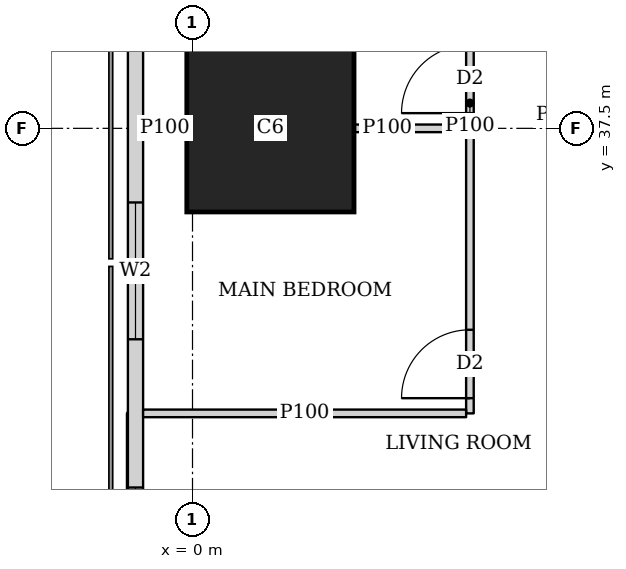
"""IFC4 building model, lengths in metres.
Left out: names, types, materials, properties, quantities, classifications, styles, units other than length and angle.
Written with IfcOpenShell. Run it as: python <this file> out.ifc"""

import sys

from ifc_helpers import new_model, si_unit, direction, frame, frame_2d, origin, origin_2d, place, context, subcontext, project, spatial, rectangle, extrude, element, fill, save


model = new_model("IFC4")
c1 = context("Model", 3, precision=1e-05, world=origin(), true_north=direction((0.0, 1.0)))
c2 = subcontext(c1, "Body", "Model", "MODEL_VIEW")
j1 = project(units=[si_unit("LENGTHUNIT", "METRE"), si_unit("PLANEANGLEUNIT", "RADIAN")], contexts=[c1])
p1 = place(None, origin())
s1 = spatial("IfcSite", under=j1, at=p1, CompositionType="ELEMENT")
p2 = place(p1, origin())
s2 = spatial("IfcBuilding", under=s1, at=p2, CompositionType="ELEMENT")
p3 = place(p2, frame((0.0, 0.0, 122.9)))
s3 = spatial("IfcBuildingStorey", under=s2, at=p3, CompositionType="ELEMENT", Elevation=122.9)
p4 = place(p3, frame((1.025, 37.5, 0.0), z_axis=(0.0, 0.0, 1.0), x_axis=(1.0, 0.0, 0.0)))
e1 = element("IfcColumn", 1, at=p4, inside=s3, PredefinedType="COLUMN", context=c2, shape_type="SweptSolid", body=[
    extrude(rectangle(XDim=2.2, YDim=2.2, at=origin_2d()), origin(), (0.0, 0.0, 1.0), 3.75),
])
p5 = place(p3, frame((-0.75, 42.837, 0.0), z_axis=(0.0, 0.0, 1.0), x_axis=(0.0, -1.0, 0.0)))
e2 = element("IfcWall", 2, at=p5, inside=s3, PredefinedType="SOLIDWALL", context=c2, shape_type="SweptSolid", body=[
    extrude(rectangle(XDim=40.674, YDim=0.2, at=frame_2d((20.337, 0.0))), origin(), (0.0, 0.0, 1.0), 3.5),
])
p6 = place(p5, frame((1.78, 0.0, 0.9)))
e3 = element("IfcOpeningElement", 3, at=p6, cuts=e2, PredefinedType="OPENING", context=c2, shape_type="SweptSolid", body=[
    extrude(rectangle(XDim=1.8, YDim=1.5, at=frame_2d((0.9, 0.75))), frame((0.0, 0.11, 0.0), z_axis=(0.0, -1.0, 0.0), x_axis=(1.0, 0.0, 0.0)), (0.0, 0.0, 1.0), 0.22),
])
p7 = place(p5, frame((6.312, 0.0, 0.9)))
e4 = element("IfcOpeningElement", 4, at=p7, cuts=e2, PredefinedType="OPENING", context=c2, shape_type="SweptSolid", body=[
    extrude(rectangle(XDim=1.8, YDim=1.5, at=frame_2d((0.9, 0.75))), frame((0.0, 0.11, 0.0), z_axis=(0.0, -1.0, 0.0), x_axis=(1.0, 0.0, 0.0)), (0.0, 0.0, 1.0), 0.22),
])
p8 = place(p5, frame((10.062, 0.0, 0.9)))
e5 = element("IfcOpeningElement", 5, at=p8, cuts=e2, PredefinedType="OPENING", context=c2, shape_type="SweptSolid", body=[
    extrude(rectangle(XDim=1.8, YDim=1.5, at=frame_2d((0.9, 0.75))), frame((0.0, 0.11, 0.0), z_axis=(0.0, -1.0, 0.0), x_axis=(1.0, 0.0, 0.0)), (0.0, 0.0, 1.0), 0.22),
])
p9 = place(p5, frame((13.812, 0.0, 0.9)))
e6 = element("IfcOpeningElement", 6, at=p9, cuts=e2, PredefinedType="OPENING", context=c2, shape_type="SweptSolid", body=[
    extrude(rectangle(XDim=1.8, YDim=1.5, at=frame_2d((0.9, 0.75))), frame((0.0, 0.11, 0.0), z_axis=(0.0, -1.0, 0.0), x_axis=(1.0, 0.0, 0.0)), (0.0, 0.0, 1.0), 0.22),
])
p10 = place(p5, frame((17.562, 0.0, 0.9)))
e7 = element("IfcOpeningElement", 7, at=p10, cuts=e2, PredefinedType="OPENING", context=c2, shape_type="SweptSolid", body=[
    extrude(rectangle(XDim=1.8, YDim=1.5, at=frame_2d((0.9, 0.75))), frame((0.0, 0.11, 0.0), z_axis=(0.0, -1.0, 0.0), x_axis=(1.0, 0.0, 0.0)), (0.0, 0.0, 1.0), 0.22),
])
p11 = place(p5, frame((21.312, 0.0, 0.9)))
e8 = element("IfcOpeningElement", 8, at=p11, cuts=e2, PredefinedType="OPENING", context=c2, shape_type="SweptSolid", body=[
    extrude(rectangle(XDim=1.8, YDim=1.5, at=frame_2d((0.9, 0.75))), frame((0.0, 0.11, 0.0), z_axis=(0.0, -1.0, 0.0), x_axis=(1.0, 0.0, 0.0)), (0.0, 0.0, 1.0), 0.22),
])
p12 = place(p5, frame((25.062, 0.0, 0.9)))
e9 = element("IfcOpeningElement", 9, at=p12, cuts=e2, PredefinedType="OPENING", context=c2, shape_type="SweptSolid", body=[
    extrude(rectangle(XDim=1.8, YDim=1.5, at=frame_2d((0.9, 0.75))), frame((0.0, 0.11, 0.0), z_axis=(0.0, -1.0, 0.0), x_axis=(1.0, 0.0, 0.0)), (0.0, 0.0, 1.0), 0.22),
])
p13 = place(p5, frame((28.812, 0.0, 0.9)))
e10 = element("IfcOpeningElement", 10, at=p13, cuts=e2, PredefinedType="OPENING", context=c2, shape_type="SweptSolid", body=[
    extrude(rectangle(XDim=1.8, YDim=1.5, at=frame_2d((0.9, 0.75))), frame((0.0, 0.11, 0.0), z_axis=(0.0, -1.0, 0.0), x_axis=(1.0, 0.0, 0.0)), (0.0, 0.0, 1.0), 0.22),
])
p14 = place(p5, frame((32.562, 0.0, 0.9)))
e11 = element("IfcOpeningElement", 11, at=p14, cuts=e2, PredefinedType="OPENING", context=c2, shape_type="SweptSolid", body=[
    extrude(rectangle(XDim=1.8, YDim=1.5, at=frame_2d((0.9, 0.75))), frame((0.0, 0.11, 0.0), z_axis=(0.0, -1.0, 0.0), x_axis=(1.0, 0.0, 0.0)), (0.0, 0.0, 1.0), 0.22),
])
p15 = place(p5, frame((37.094, 0.0, 0.9)))
e12 = element("IfcOpeningElement", 12, at=p15, cuts=e2, PredefinedType="OPENING", context=c2, shape_type="SweptSolid", body=[
    extrude(rectangle(XDim=1.8, YDim=1.5, at=frame_2d((0.9, 0.75))), frame((0.0, 0.11, 0.0), z_axis=(0.0, -1.0, 0.0), x_axis=(1.0, 0.0, 0.0)), (0.0, 0.0, 1.0), 0.22),
])
p16 = place(p3, frame((3.65, 33.75, 0.0), z_axis=(0.0, 0.0, 1.0), x_axis=(0.0, 1.0, 0.0)))
e13 = element("IfcWall", 13, at=p16, inside=s3, PredefinedType="PARTITIONING", context=c2, shape_type="SweptSolid", body=[
    extrude(rectangle(XDim=8.165, YDim=0.1, at=frame_2d((4.083, 0.0))), origin(), (0.0, 0.0, 1.0), 3.5),
])
p17 = place(p16, frame((0.2, 0.0, 0.0)))
e14 = element("IfcOpeningElement", 14, at=p17, cuts=e13, PredefinedType="OPENING", context=c2, shape_type="SweptSolid", body=[
    extrude(rectangle(XDim=0.9, YDim=2.1, at=frame_2d((0.45, 1.05))), frame((0.0, 0.06, 0.0), z_axis=(0.0, -1.0, 0.0), x_axis=(1.0, 0.0, 0.0)), (0.0, 0.0, 1.0), 0.12),
])
p18 = place(p16, frame((3.95, 0.0, 0.0)))
e15 = element("IfcOpeningElement", 15, at=p18, cuts=e13, PredefinedType="OPENING", context=c2, shape_type="SweptSolid", body=[
    extrude(rectangle(XDim=0.9, YDim=2.1, at=frame_2d((0.45, 1.05))), frame((0.0, 0.06, 0.0), z_axis=(0.0, -1.0, 0.0), x_axis=(1.0, 0.0, 0.0)), (0.0, 0.0, 1.0), 0.12),
])
p19 = place(p3, frame((-0.65, 33.75, 0.0), z_axis=(0.0, 0.0, 1.0), x_axis=(1.0, 0.0, 0.0)))
e16 = element("IfcWall", 16, at=p19, inside=s3, PredefinedType="PARTITIONING", context=c2, shape_type="SweptSolid", body=[
    extrude(rectangle(XDim=4.25, YDim=0.1, at=frame_2d((2.125, 0.0))), origin(), (0.0, 0.0, 1.0), 2.2),
])
p20 = place(p3, frame((-0.65, 37.5, 0.0), z_axis=(0.0, 0.0, 1.0), x_axis=(1.0, 0.0, 0.0)))
e17 = element("IfcWall", 17, at=p20, inside=s3, PredefinedType="PARTITIONING", context=c2, shape_type="SweptSolid", body=[
    extrude(rectangle(XDim=0.574, YDim=0.1, at=frame_2d((0.287, 0.0))), origin(), (0.0, 0.0, 1.0), 2.05),
])
p21 = place(p3, frame((2.126, 37.5, 0.0), z_axis=(0.0, 0.0, 1.0), x_axis=(1.0, 0.0, 0.0)))
e18 = element("IfcWall", 18, at=p21, inside=s3, PredefinedType="PARTITIONING", context=c2, shape_type="SweptSolid", body=[
    extrude(rectangle(XDim=1.474, YDim=0.1, at=frame_2d((0.737, 0.0))), origin(), (0.0, 0.0, 1.0), 2.05),
])
p22 = place(p7, origin())
e19 = element("IfcWindow", 19, at=p22, inside=s3, PartitioningType="SINGLE_PANEL", PredefinedType="WINDOW", context=c2, shape_type="SweptSolid", body=[
    extrude(rectangle(XDim=1.8, YDim=1.5, at=frame_2d((0.9, 0.75))), frame((0.0, 0.03, 0.0), z_axis=(0.0, -1.0, 0.0), x_axis=(1.0, 0.0, 0.0)), (0.0, 0.0, 1.0), 0.06),
])
fill(e4, e19)
p23 = place(p8, origin())
e20 = element("IfcWindow", 20, at=p23, inside=s3, PartitioningType="SINGLE_PANEL", PredefinedType="WINDOW", context=c2, shape_type="SweptSolid", body=[
    extrude(rectangle(XDim=1.8, YDim=1.5, at=frame_2d((0.9, 0.75))), frame((0.0, 0.03, 0.0), z_axis=(0.0, -1.0, 0.0), x_axis=(1.0, 0.0, 0.0)), (0.0, 0.0, 1.0), 0.06),
])
fill(e5, e20)
p24 = place(p17, origin())
e21 = element("IfcDoor", 21, at=p24, inside=s3, OperationType="SINGLE_SWING_LEFT", PredefinedType="DOOR", context=c2, shape_type="SweptSolid", body=[
    extrude(rectangle(XDim=0.9, YDim=2.1, at=frame_2d((0.45, 1.05))), frame((0.0, 0.025, 0.0), z_axis=(0.0, -1.0, 0.0), x_axis=(1.0, 0.0, 0.0)), (0.0, 0.0, 1.0), 0.05),
])
fill(e14, e21)
p25 = place(p18, origin())
e22 = element("IfcDoor", 22, at=p25, inside=s3, OperationType="SINGLE_SWING_LEFT", PredefinedType="DOOR", context=c2, shape_type="SweptSolid", body=[
    extrude(rectangle(XDim=0.9, YDim=2.1, at=frame_2d((0.45, 1.05))), frame((0.0, 0.025, 0.0), z_axis=(0.0, -1.0, 0.0), x_axis=(1.0, 0.0, 0.0)), (0.0, 0.0, 1.0), 0.05),
])
fill(e15, e22)
save(model, sys.argv[1])
